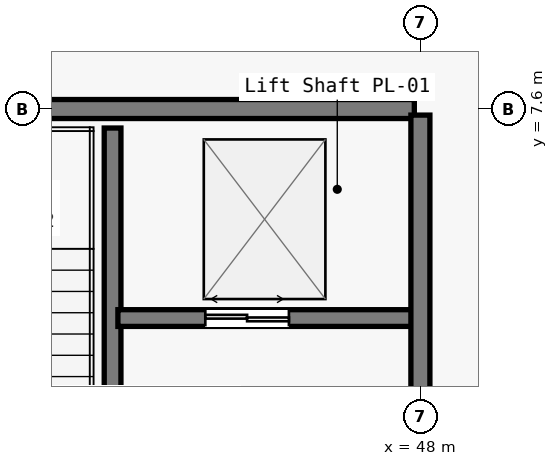
"""IFC4 building model, lengths in metres.
Left out: names, types, materials, properties, quantities, classifications, styles, units other than length and angle.
Written with IfcOpenShell. Run it as: python <this file> out.ifc"""

import sys

from ifc_helpers import new_model, si_unit, direction, frame, frame_2d, origin, place, context, subcontext, project, spatial, rectangle, extrude, element, fill, save


model = new_model("IFC4")
c1 = context("Model", 3, precision=1e-05, world=origin(), true_north=direction((0.0, 1.0)))
c2 = subcontext(c1, "Body", "Model", "MODEL_VIEW")
j1 = project(units=[si_unit("LENGTHUNIT", "METRE"), si_unit("PLANEANGLEUNIT", "RADIAN")], contexts=[c1])
p1 = place(None, origin())
s1 = spatial("IfcSite", under=j1, at=p1, CompositionType="ELEMENT")
p2 = place(p1, origin())
s2 = spatial("IfcBuilding", under=s1, at=p2, CompositionType="ELEMENT")
p3 = place(p2, frame((0.0, 0.0, -5.4)))
s3 = spatial("IfcBuildingStorey", under=s2, at=p3, CompositionType="ELEMENT", Elevation=-5.4)
p4 = place(p3, frame((40.4, 7.6, 0.0), z_axis=(0.0, 0.0, 1.0), x_axis=(1.0, 0.0, 0.0)))
e1 = element("IfcWall", 1, at=p4, inside=s3, PredefinedType="SOLIDWALL", context=c2, shape_type="SweptSolid", body=[
    extrude(rectangle(XDim=7.52, YDim=0.25, at=frame_2d((3.76, 0.0))), origin(), (0.0, 0.0, 1.0), 4.255),
])
p5 = place(p3, frame((43.95, 0.25, 0.0), z_axis=(0.0, 0.0, 1.0), x_axis=(0.0, 1.0, 0.0)))
e2 = element("IfcWall", 2, at=p5, inside=s3, PredefinedType="SOLIDWALL", context=c2, shape_type="SweptSolid", body=[
    extrude(rectangle(XDim=7.1, YDim=0.22, at=frame_2d((3.55, 0.0))), origin(), (0.0, 0.0, 1.0), 5.08),
])
p6 = place(p5, frame((0.35, 0.0, 0.0)))
e3 = element("IfcOpeningElement", 3, at=p6, cuts=e2, PredefinedType="OPENING", context=c2, shape_type="SweptSolid", body=[
    extrude(rectangle(XDim=1.2, YDim=2.15, at=frame_2d((0.6, 1.075))), frame((0.0, 0.12, 0.0), z_axis=(0.0, -1.0, 0.0), x_axis=(1.0, 0.0, 0.0)), (0.0, 0.0, 1.0), 0.24),
])
p7 = place(p3, frame((44.02, 4.85, 0.0), z_axis=(0.0, 0.0, 1.0), x_axis=(1.0, 0.0, 0.0)))
e4 = element("IfcWall", 4, at=p7, inside=s3, PredefinedType="SOLIDWALL", context=c2, shape_type="SweptSolid", body=[
    extrude(rectangle(XDim=3.93, YDim=0.22, at=frame_2d((1.965, 0.0))), origin(), (0.0, 0.0, 1.0), 4.48),
])
p8 = place(p7, frame((1.15, 0.0, 0.0)))
e5 = element("IfcOpeningElement", 5, at=p8, cuts=e4, PredefinedType="OPENING", context=c2, shape_type="SweptSolid", body=[
    extrude(rectangle(XDim=1.1, YDim=2.2, at=frame_2d((0.55, 1.1))), frame((0.0, 0.12, 0.0), z_axis=(0.0, -1.0, 0.0), x_axis=(1.0, 0.0, 0.0)), (0.0, 0.0, 1.0), 0.24),
])
p9 = place(p3, frame((48.0, 0.08, 0.0), z_axis=(0.0, 0.0, 1.0), x_axis=(0.0, 1.0, 0.0)))
e6 = element("IfcWall", 6, at=p9, inside=s3, PredefinedType="SOLIDWALL", context=c2, shape_type="SweptSolid", body=[
    extrude(rectangle(XDim=7.44, YDim=0.25, at=frame_2d((3.72, 0.0))), origin(), (0.0, 0.0, 1.0), 4.255),
])
p10 = place(p9, frame((2.27, 0.0, 0.0)))
e7 = element("IfcOpeningElement", 7, at=p10, cuts=e6, PredefinedType="OPENING", context=c2, shape_type="SweptSolid", body=[
    extrude(rectangle(XDim=1.35, YDim=2.2, at=frame_2d((0.675, 1.1))), frame((0.0, 0.135, 0.0), z_axis=(0.0, -1.0, 0.0), x_axis=(1.0, 0.0, 0.0)), (0.0, 0.0, 1.0), 0.27),
])
p11 = place(p8, origin())
e8 = element("IfcDoor", 8, at=p11, inside=s3, OperationType="DOUBLE_DOOR_SLIDING", PredefinedType="DOOR", context=c2, shape_type="SweptSolid", body=[
    extrude(rectangle(XDim=1.1, YDim=2.2, at=frame_2d((0.55, 1.1))), frame((0.0, 0.025, 0.0), z_axis=(0.0, -1.0, 0.0), x_axis=(1.0, 0.0, 0.0)), (0.0, 0.0, 1.0), 0.05),
])
fill(e5, e8)
save(model, sys.argv[1])
